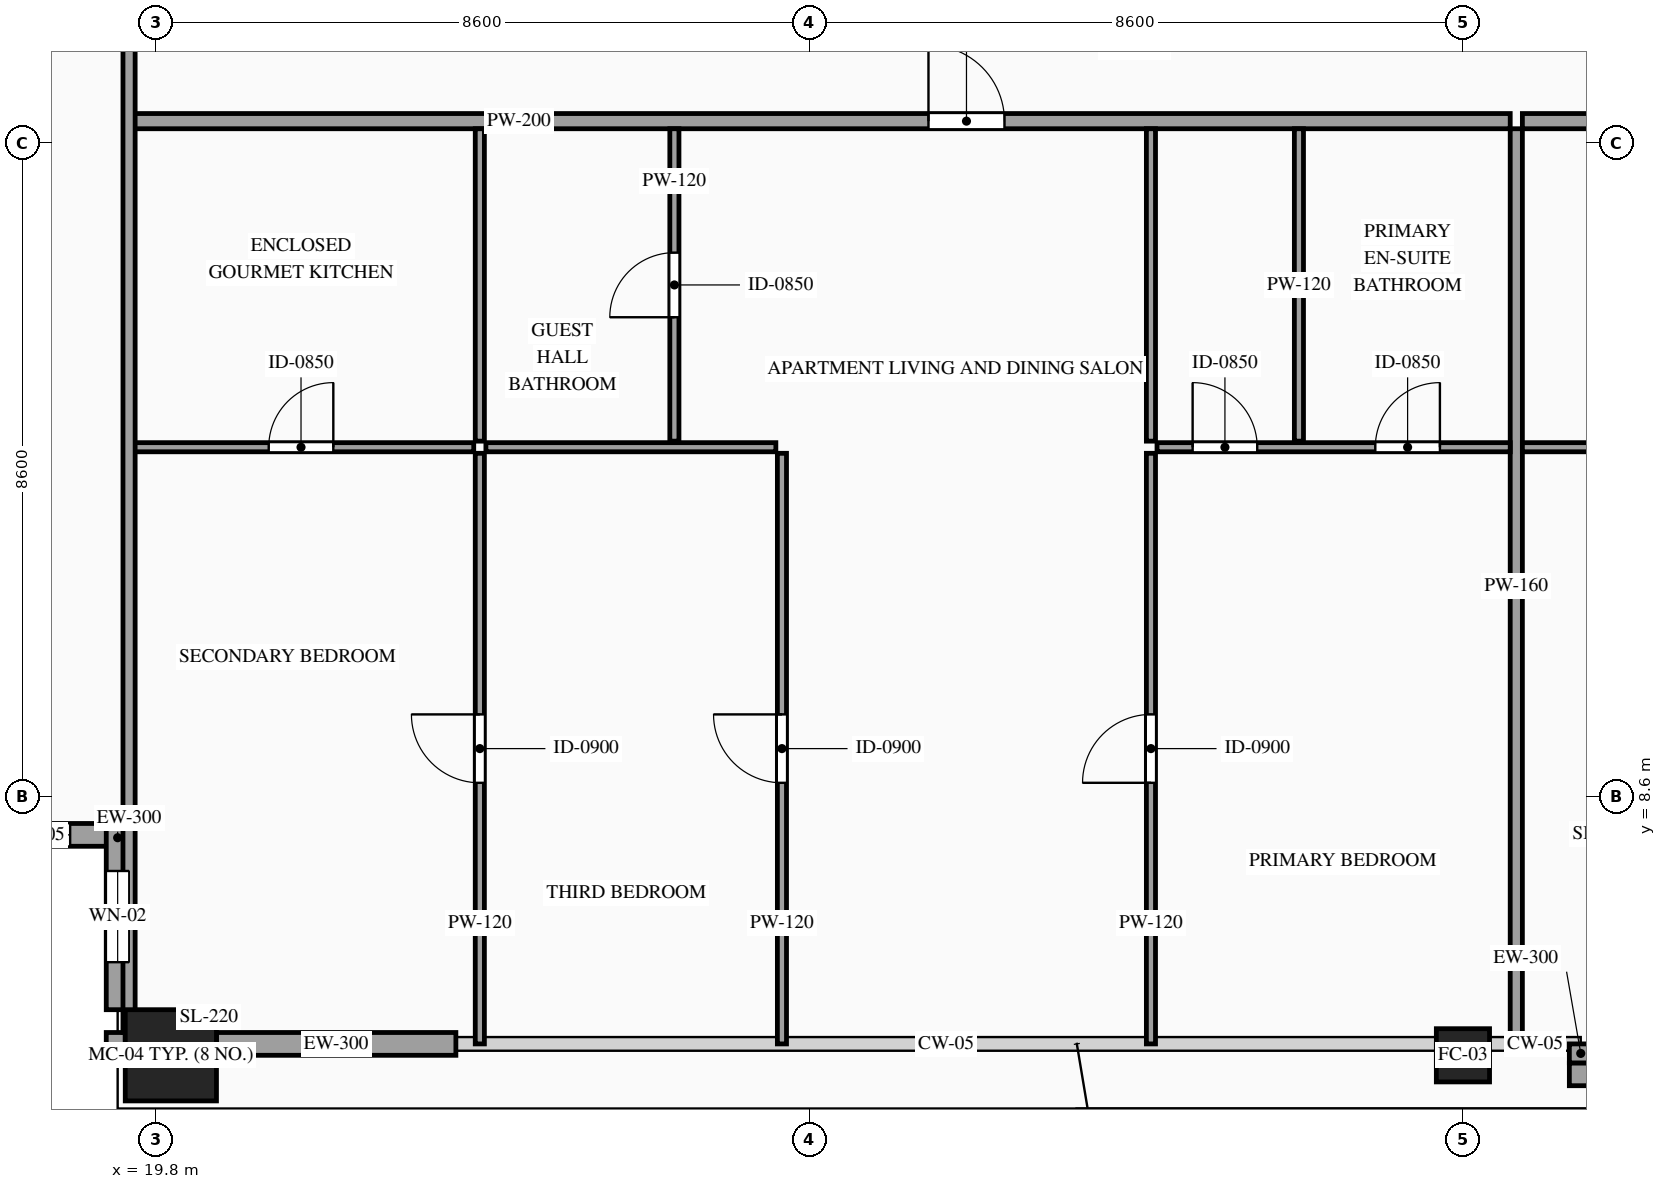
"""IFC4 building model, lengths in metres.
Left out: names, types, materials, properties, quantities, classifications, styles, units other than length and angle.
Written with IfcOpenShell. Run it as: python <this file> out.ifc"""

import sys

from ifc_helpers import new_model, si_unit, direction, frame, frame_2d, origin, origin_2d, place, context, subcontext, project, spatial, rectangle, hollow_rectangle, extrude, source, transform, mapped, element, fill, save


model = new_model("IFC4")
c1 = context("Model", 3, precision=1e-05, world=origin(), true_north=direction((0.0, 1.0)))
c2 = subcontext(c1, "Body", "Model", "MODEL_VIEW")
j1 = project(units=[si_unit("LENGTHUNIT", "METRE"), si_unit("PLANEANGLEUNIT", "RADIAN")], contexts=[c1])
p1 = place(None, origin())
s1 = spatial("IfcSite", under=j1, at=p1, CompositionType="ELEMENT")
p2 = place(p1, origin())
s2 = spatial("IfcBuilding", under=s1, at=p2, CompositionType="ELEMENT")
p3 = place(p2, frame((0.0, 0.0, 227.6)))
s3 = spatial("IfcBuildingStorey", under=s2, at=p3, CompositionType="ELEMENT", Elevation=227.6)
m1 = source(origin(), c2, "Body", "SweptSolid", [
    extrude(hollow_rectangle(XDim=1.2, YDim=1.2, WallThickness=0.055, at=origin_2d()), origin(), (0.0, 0.0, 1.0), 3.5),
])
p4 = place(p3, frame((20.0, 5.2, 0.0), z_axis=(0.0, 0.0, 1.0), x_axis=(1.0, 0.0, 0.0)))
e1 = element("IfcColumn", 1, at=p4, inside=s3, PredefinedType="COLUMN", context=c2, shape_type="MappedRepresentation", body=[
    mapped(m1, transform((0.0, 0.0, 0.0), scale=1.0)),
])
m2 = source(origin(), c2, "Body", "SweptSolid", [
    extrude(hollow_rectangle(XDim=0.7, YDim=0.7, WallThickness=0.032, at=origin_2d()), origin(), (0.0, 0.0, 1.0), 3.5),
])
p5 = place(p3, frame((37.0, 5.2, 0.0), z_axis=(0.0, 0.0, 1.0), x_axis=(1.0, 0.0, 0.0)))
e2 = element("IfcColumn", 2, at=p5, inside=s3, PredefinedType="COLUMN", context=c2, shape_type="MappedRepresentation", body=[
    mapped(m2, transform((0.0, 0.0, 0.0), scale=1.0)),
])
p6 = place(p3, frame((17.0, 8.1, 0.0), z_axis=(0.0, 0.0, 1.0), x_axis=(1.0, 0.0, 0.0)))
e3 = element("IfcWall", 3, at=p6, inside=s3, PredefinedType="SOLIDWALL", context=c2, shape_type="SweptSolid", body=[
    extrude(rectangle(XDim=2.45, YDim=0.3, at=frame_2d((1.225, 0.0))), origin(), (0.0, 0.0, 1.0), 3.28),
])
p7 = place(p6, frame((0.775, 0.0, 0.85)))
e4 = element("IfcOpeningElement", 4, at=p7, cuts=e3, PredefinedType="OPENING", context=c2, shape_type="SweptSolid", body=[
    extrude(rectangle(XDim=0.9, YDim=1.5, at=frame_2d((0.45, 0.75))), frame((0.0, 0.165, 0.0), z_axis=(0.0, -1.0, 0.0), x_axis=(1.0, 0.0, 0.0)), (0.0, 0.0, 1.0), 0.33),
])
p8 = place(p3, frame((19.3, 8.25, 0.0), z_axis=(0.0, 0.0, 1.0), x_axis=(0.0, -1.0, 0.0)))
e5 = element("IfcWall", 5, at=p8, inside=s3, PredefinedType="SOLIDWALL", context=c2, shape_type="SweptSolid", body=[
    extrude(rectangle(XDim=2.45, YDim=0.3, at=frame_2d((1.225, 0.0))), origin(), (0.0, 0.0, 1.0), 3.28),
])
p9 = place(p8, frame((0.625, 0.0, 0.85)))
e6 = element("IfcOpeningElement", 6, at=p9, cuts=e5, PredefinedType="OPENING", context=c2, shape_type="SweptSolid", body=[
    extrude(rectangle(XDim=1.2, YDim=2.1, at=frame_2d((0.6, 1.05))), frame((0.0, 0.165, 0.0), z_axis=(0.0, -1.0, 0.0), x_axis=(1.0, 0.0, 0.0)), (0.0, 0.0, 1.0), 0.33),
])
m3 = source(origin(), c2, "Body", "SweptSolid", [
    extrude(rectangle(XDim=0.25, YDim=0.3, at=frame_2d((0.125, 0.0))), origin(), (0.0, 0.0, 1.0), 3.28),
])
p10 = place(p3, frame((19.15, 5.35, 0.0), z_axis=(0.0, 0.0, 1.0), x_axis=(1.0, 0.0, 0.0)))
e7 = element("IfcWall", 7, at=p10, inside=s3, PredefinedType="SOLIDWALL", context=c2, shape_type="MappedRepresentation", body=[
    mapped(m3, transform((0.0, 0.0, 0.0), scale=1.0)),
])
m4 = source(origin(), c2, "Body", "SweptSolid", [
    extrude(rectangle(XDim=3.15, YDim=0.3, at=frame_2d((1.575, 0.0))), origin(), (0.0, 0.0, 1.0), 2.835),
])
p11 = place(p3, frame((20.6, 5.35, 0.0), z_axis=(0.0, 0.0, 1.0), x_axis=(1.0, 0.0, 0.0)))
e8 = element("IfcWall", 8, at=p11, inside=s3, PredefinedType="SOLIDWALL", context=c2, shape_type="MappedRepresentation", body=[
    mapped(m4, transform((0.0, 0.0, 0.0), scale=1.0)),
])
p12 = place(p3, frame((38.4, 4.95, 0.0), z_axis=(0.0, 0.0, 1.0), x_axis=(1.0, 0.0, 0.0)))
e9 = element("IfcWall", 9, at=p12, inside=s3, PredefinedType="SOLIDWALL", context=c2, shape_type="SweptSolid", body=[
    extrude(rectangle(XDim=2.0, YDim=0.3, at=frame_2d((1.0, 0.0))), origin(), (0.0, 0.0, 1.0), 2.835),
])
p13 = place(p12, frame((0.3, 0.0, 0.0)))
e10 = element("IfcOpeningElement", 10, at=p13, cuts=e9, PredefinedType="OPENING", context=c2, shape_type="SweptSolid", body=[
    extrude(rectangle(XDim=1.4, YDim=2.3, at=frame_2d((0.7, 1.15))), frame((0.0, 0.165, 0.0), z_axis=(0.0, -1.0, 0.0), x_axis=(1.0, 0.0, 0.0)), (0.0, 0.0, 1.0), 0.33),
])
p14 = place(p3, frame((38.55, 5.35, 0.0), z_axis=(0.0, 0.0, 1.0), x_axis=(0.0, -1.0, 0.0)))
e11 = element("IfcWall", 11, at=p14, inside=s3, PredefinedType="SOLIDWALL", context=c2, shape_type="MappedRepresentation", body=[
    mapped(m3, transform((0.0, 0.0, 0.0), scale=1.0)),
])
p15 = place(p3, frame((19.44, 17.49, 0.0), z_axis=(0.0, 0.0, 1.0), x_axis=(1.0, 0.0, 0.0)))
e12 = element("IfcWall", 12, at=p15, inside=s3, PredefinedType="PARTITIONING", context=c2, shape_type="SweptSolid", body=[
    extrude(rectangle(XDim=18.182, YDim=0.2, at=frame_2d((9.091, 0.0))), origin(), (0.0, 0.0, 1.0), 3.28),
])
p16 = place(p15, frame((10.528, 0.0, 0.0)))
e13 = element("IfcOpeningElement", 13, at=p16, cuts=e12, PredefinedType="OPENING", context=c2, shape_type="SweptSolid", body=[
    extrude(rectangle(XDim=1.0, YDim=2.2, at=frame_2d((0.5, 1.1))), frame((0.0, 0.115, 0.0), z_axis=(0.0, -1.0, 0.0), x_axis=(1.0, 0.0, 0.0)), (0.0, 0.0, 1.0), 0.23),
])
m5 = source(origin(), c2, "Body", "SweptSolid", [
    extrude(rectangle(XDim=12.04, YDim=0.16, at=frame_2d((6.02, 0.0))), origin(), (0.0, 0.0, 1.0), 3.28),
])
p17 = place(p3, frame((37.702, 5.35, 0.0), z_axis=(0.0, 0.0, 1.0), x_axis=(0.0, 1.0, 0.0)))
e14 = element("IfcWall", 14, at=p17, inside=s3, PredefinedType="PARTITIONING", context=c2, shape_type="MappedRepresentation", body=[
    mapped(m5, transform((0.0, 0.0, 0.0), scale=1.0)),
])
p18 = place(p3, frame((19.44, 13.2, 0.0), z_axis=(0.0, 0.0, 1.0), x_axis=(1.0, 0.0, 0.0)))
e15 = element("IfcWall", 15, at=p18, inside=s3, PredefinedType="PARTITIONING", context=c2, shape_type="SweptSolid", body=[
    extrude(rectangle(XDim=4.545, YDim=0.12, at=frame_2d((2.272, 0.0))), origin(), (0.0, 0.0, 1.0), 3.28),
])
p19 = place(p18, frame((1.847, 0.0, 0.0)))
e16 = element("IfcOpeningElement", 16, at=p19, cuts=e15, PredefinedType="OPENING", context=c2, shape_type="SweptSolid", body=[
    extrude(rectangle(XDim=0.85, YDim=2.1, at=frame_2d((0.425, 1.05))), frame((0.0, 0.075, 0.0), z_axis=(0.0, -1.0, 0.0), x_axis=(1.0, 0.0, 0.0)), (0.0, 0.0, 1.0), 0.15),
])
m6 = source(origin(), c2, "Body", "SweptSolid", [
    extrude(rectangle(XDim=4.11, YDim=0.12, at=frame_2d((2.055, 0.0))), origin(), (0.0, 0.0, 1.0), 3.28),
])
p20 = place(p3, frame((24.065, 13.28, 0.0), z_axis=(0.0, 0.0, 1.0), x_axis=(0.0, 1.0, 0.0)))
e17 = element("IfcWall", 17, at=p20, inside=s3, PredefinedType="PARTITIONING", context=c2, shape_type="MappedRepresentation", body=[
    mapped(m6, transform((0.0, 0.0, 0.0), scale=1.0)),
])
p21 = place(p3, frame((26.625, 13.28, 0.0), z_axis=(0.0, 0.0, 1.0), x_axis=(0.0, 1.0, 0.0)))
e18 = element("IfcWall", 18, at=p21, inside=s3, PredefinedType="PARTITIONING", context=c2, shape_type="SweptSolid", body=[
    extrude(rectangle(XDim=4.11, YDim=0.12, at=frame_2d((2.055, 0.0))), origin(), (0.0, 0.0, 1.0), 3.28),
])
p22 = place(p21, frame((1.63, 0.0, 0.0)))
e19 = element("IfcOpeningElement", 19, at=p22, cuts=e18, PredefinedType="OPENING", context=c2, shape_type="SweptSolid", body=[
    extrude(rectangle(XDim=0.85, YDim=2.1, at=frame_2d((0.425, 1.05))), frame((0.0, 0.075, 0.0), z_axis=(0.0, -1.0, 0.0), x_axis=(1.0, 0.0, 0.0)), (0.0, 0.0, 1.0), 0.15),
])
for number, where, z_axis, x_axis in (
    (20, (34.842, 13.28, 0.0), (0.0, 0.0, 1.0), (0.0, 1.0, 0.0)),
    (21, (32.895, 13.28, 0.0), (0.0, 0.0, 1.0), (0.0, 1.0, 0.0)),
):
    element("IfcWall", number, at=place(p3, frame(where, z_axis=z_axis, x_axis=x_axis)), inside=s3, PredefinedType="PARTITIONING", context=c2, shape_type="MappedRepresentation", body=[
        mapped(m6, transform((0.0, 0.0, 0.0), scale=1.0)),
    ])
p23 = place(p3, frame((24.065, 5.35, 0.0), z_axis=(0.0, 0.0, 1.0), x_axis=(0.0, 1.0, 0.0)))
e22 = element("IfcWall", 22, at=p23, inside=s3, PredefinedType="PARTITIONING", context=c2, shape_type="SweptSolid", body=[
    extrude(rectangle(XDim=7.77, YDim=0.12, at=frame_2d((3.885, 0.0))), origin(), (0.0, 0.0, 1.0), 3.28),
])
p24 = place(p23, frame((3.435, 0.0, 0.0)))
e23 = element("IfcOpeningElement", 23, at=p24, cuts=e22, PredefinedType="OPENING", context=c2, shape_type="SweptSolid", body=[
    extrude(rectangle(XDim=0.9, YDim=2.15, at=frame_2d((0.45, 1.075))), frame((0.0, 0.075, 0.0), z_axis=(0.0, -1.0, 0.0), x_axis=(1.0, 0.0, 0.0)), (0.0, 0.0, 1.0), 0.15),
])
p25 = place(p3, frame((32.975, 13.2, 0.0), z_axis=(0.0, 0.0, 1.0), x_axis=(1.0, 0.0, 0.0)))
e24 = element("IfcWall", 24, at=p25, inside=s3, PredefinedType="PARTITIONING", context=c2, shape_type="SweptSolid", body=[
    extrude(rectangle(XDim=4.647, YDim=0.12, at=frame_2d((2.323, 0.0))), origin(), (0.0, 0.0, 1.0), 3.28),
])
p26 = place(p25, frame((2.872, 0.0, 0.0)))
e25 = element("IfcOpeningElement", 25, at=p26, cuts=e24, PredefinedType="OPENING", context=c2, shape_type="SweptSolid", body=[
    extrude(rectangle(XDim=0.85, YDim=2.1, at=frame_2d((0.425, 1.05))), frame((0.0, 0.075, 0.0), z_axis=(0.0, -1.0, 0.0), x_axis=(1.0, 0.0, 0.0)), (0.0, 0.0, 1.0), 0.15),
])
p27 = place(p25, frame((0.469, 0.0, 0.0)))
e26 = element("IfcOpeningElement", 26, at=p27, cuts=e24, PredefinedType="OPENING", context=c2, shape_type="SweptSolid", body=[
    extrude(rectangle(XDim=0.85, YDim=2.1, at=frame_2d((0.425, 1.05))), frame((0.0, 0.075, 0.0), z_axis=(0.0, -1.0, 0.0), x_axis=(1.0, 0.0, 0.0)), (0.0, 0.0, 1.0), 0.15),
])
p28 = place(p3, frame((32.895, 5.35, 0.0), z_axis=(0.0, 0.0, 1.0), x_axis=(0.0, 1.0, 0.0)))
e27 = element("IfcWall", 27, at=p28, inside=s3, PredefinedType="PARTITIONING", context=c2, shape_type="SweptSolid", body=[
    extrude(rectangle(XDim=7.77, YDim=0.12, at=frame_2d((3.885, 0.0))), origin(), (0.0, 0.0, 1.0), 3.28),
])
p29 = place(p28, frame((3.435, 0.0, 0.0)))
e28 = element("IfcOpeningElement", 28, at=p29, cuts=e27, PredefinedType="OPENING", context=c2, shape_type="SweptSolid", body=[
    extrude(rectangle(XDim=0.9, YDim=2.15, at=frame_2d((0.45, 1.075))), frame((0.0, 0.075, 0.0), z_axis=(0.0, -1.0, 0.0), x_axis=(1.0, 0.0, 0.0)), (0.0, 0.0, 1.0), 0.15),
])
m7 = source(origin(), c2, "Body", "SweptSolid", [
    extrude(rectangle(XDim=3.815, YDim=0.12, at=frame_2d((1.907, 0.0))), origin(), (0.0, 0.0, 1.0), 3.28),
])
p30 = place(p3, frame((24.145, 13.2, 0.0), z_axis=(0.0, 0.0, 1.0), x_axis=(1.0, 0.0, 0.0)))
e29 = element("IfcWall", 29, at=p30, inside=s3, PredefinedType="PARTITIONING", context=c2, shape_type="MappedRepresentation", body=[
    mapped(m7, transform((0.0, 0.0, 0.0), scale=1.0)),
])
p31 = place(p3, frame((28.04, 5.35, 0.0), z_axis=(0.0, 0.0, 1.0), x_axis=(0.0, 1.0, 0.0)))
e30 = element("IfcWall", 30, at=p31, inside=s3, PredefinedType="PARTITIONING", context=c2, shape_type="SweptSolid", body=[
    extrude(rectangle(XDim=7.77, YDim=0.12, at=frame_2d((3.885, 0.0))), origin(), (0.0, 0.0, 1.0), 3.28),
])
p32 = place(p31, frame((3.435, 0.0, 0.0)))
e31 = element("IfcOpeningElement", 31, at=p32, cuts=e30, PredefinedType="OPENING", context=c2, shape_type="SweptSolid", body=[
    extrude(rectangle(XDim=0.9, YDim=2.15, at=frame_2d((0.45, 1.075))), frame((0.0, 0.075, 0.0), z_axis=(0.0, -1.0, 0.0), x_axis=(1.0, 0.0, 0.0)), (0.0, 0.0, 1.0), 0.15),
])
p33 = place(p3, frame((37.782, 17.49, 0.0), z_axis=(0.0, 0.0, 1.0), x_axis=(1.0, 0.0, 0.0)))
e32 = element("IfcWall", 32, at=p33, inside=s3, PredefinedType="PARTITIONING", context=c2, shape_type="SweptSolid", body=[
    extrude(rectangle(XDim=16.778, YDim=0.2, at=frame_2d((8.389, 0.0))), origin(), (0.0, 0.0, 1.0), 3.28),
])
p34 = place(p33, frame((9.545, 0.0, 0.0)))
e33 = element("IfcOpeningElement", 33, at=p34, cuts=e32, PredefinedType="OPENING", context=c2, shape_type="SweptSolid", body=[
    extrude(rectangle(XDim=1.0, YDim=2.2, at=frame_2d((0.5, 1.1))), frame((0.0, 0.115, 0.0), z_axis=(0.0, -1.0, 0.0), x_axis=(1.0, 0.0, 0.0)), (0.0, 0.0, 1.0), 0.23),
])
p35 = place(p3, frame((37.782, 13.2, 0.0), z_axis=(0.0, 0.0, 1.0), x_axis=(1.0, 0.0, 0.0)))
e34 = element("IfcWall", 34, at=p35, inside=s3, PredefinedType="PARTITIONING", context=c2, shape_type="SweptSolid", body=[
    extrude(rectangle(XDim=4.647, YDim=0.12, at=frame_2d((2.323, 0.0))), origin(), (0.0, 0.0, 1.0), 3.28),
])
p36 = place(p35, frame((1.898, 0.0, 0.0)))
e35 = element("IfcOpeningElement", 35, at=p36, cuts=e34, PredefinedType="OPENING", context=c2, shape_type="SweptSolid", body=[
    extrude(rectangle(XDim=0.85, YDim=2.1, at=frame_2d((0.425, 1.05))), frame((0.0, 0.075, 0.0), z_axis=(0.0, -1.0, 0.0), x_axis=(1.0, 0.0, 0.0)), (0.0, 0.0, 1.0), 0.15),
])
m8 = source(origin(), c2, "Body", "SweptSolid", [
    extrude(rectangle(XDim=26.69, YDim=0.16, at=frame_2d((13.345, 0.0))), origin(), (0.0, 0.0, 1.0), 3.28),
])
p37 = place(p3, frame((19.45, 5.5, 0.0), z_axis=(0.0, 0.0, 1.0), x_axis=(0.0, 1.0, 0.0)))
e36 = element("IfcWall", 36, at=p37, inside=s3, PredefinedType="PARTITIONING", context=c2, shape_type="MappedRepresentation", body=[
    mapped(m8, transform((0.0, 0.0, 0.0), scale=1.0)),
])
m9 = source(origin(), c2, "Body", "SweptSolid", [
    extrude(rectangle(XDim=0.9, YDim=1.5, at=frame_2d((0.45, 0.75))), frame((0.0, 0.03, 0.0), z_axis=(0.0, -1.0, 0.0), x_axis=(1.0, 0.0, 0.0)), (0.0, 0.0, 1.0), 0.06),
])
p38 = place(p7, origin())
e37 = element("IfcWindow", 37, at=p38, inside=s3, PartitioningType="SINGLE_PANEL", PredefinedType="WINDOW", context=c2, shape_type="MappedRepresentation", body=[
    mapped(m9, transform((0.0, 0.0, 0.0), scale=1.0)),
])
fill(e4, e37)
m10 = source(origin(), c2, "Body", "SweptSolid", [
    extrude(rectangle(XDim=1.2, YDim=2.1, at=frame_2d((0.6, 1.05))), frame((0.0, 0.03, 0.0), z_axis=(0.0, -1.0, 0.0), x_axis=(1.0, 0.0, 0.0)), (0.0, 0.0, 1.0), 0.06),
])
p39 = place(p9, origin())
e38 = element("IfcWindow", 38, at=p39, inside=s3, PartitioningType="SINGLE_PANEL", PredefinedType="WINDOW", context=c2, shape_type="MappedRepresentation", body=[
    mapped(m10, transform((0.0, 0.0, 0.0), scale=1.0)),
])
fill(e6, e38)
m11 = source(origin(), c2, "Body", "SweptSolid", [
    extrude(rectangle(XDim=1.0, YDim=2.2, at=frame_2d((0.5, 1.1))), frame((0.0, 0.025, 0.0), z_axis=(0.0, -1.0, 0.0), x_axis=(1.0, 0.0, 0.0)), (0.0, 0.0, 1.0), 0.05),
])
p40 = place(p16, origin())
e39 = element("IfcDoor", 39, at=p40, inside=s3, OperationType="SINGLE_SWING_LEFT", PredefinedType="DOOR", context=c2, shape_type="MappedRepresentation", body=[
    mapped(m11, transform((0.0, 0.0, 0.0), scale=1.0)),
])
fill(e13, e39)
m12 = source(origin(), c2, "Body", "SweptSolid", [
    extrude(rectangle(XDim=0.85, YDim=2.1, at=frame_2d((0.425, 1.05))), frame((0.0, 0.025, 0.0), z_axis=(0.0, -1.0, 0.0), x_axis=(1.0, 0.0, 0.0)), (0.0, 0.0, 1.0), 0.05),
])
p41 = place(p19, origin())
e40 = element("IfcDoor", 40, at=p41, inside=s3, OperationType="SINGLE_SWING_RIGHT", PredefinedType="DOOR", context=c2, shape_type="MappedRepresentation", body=[
    mapped(m12, transform((0.0, 0.0, 0.0), scale=1.0)),
])
fill(e16, e40)
p42 = place(p22, origin())
e41 = element("IfcDoor", 41, at=p42, inside=s3, OperationType="SINGLE_SWING_LEFT", PredefinedType="DOOR", context=c2, shape_type="MappedRepresentation", body=[
    mapped(m12, transform((0.0, 0.0, 0.0), scale=1.0)),
])
fill(e19, e41)
p43 = place(p26, origin())
e42 = element("IfcDoor", 42, at=p43, inside=s3, OperationType="SINGLE_SWING_RIGHT", PredefinedType="DOOR", context=c2, shape_type="MappedRepresentation", body=[
    mapped(m12, transform((0.0, 0.0, 0.0), scale=1.0)),
])
fill(e25, e42)
p44 = place(p27, origin())
e43 = element("IfcDoor", 43, at=p44, inside=s3, OperationType="SINGLE_SWING_LEFT", PredefinedType="DOOR", context=c2, shape_type="MappedRepresentation", body=[
    mapped(m12, transform((0.0, 0.0, 0.0), scale=1.0)),
])
fill(e26, e43)
m13 = source(origin(), c2, "Body", "SweptSolid", [
    extrude(rectangle(XDim=0.9, YDim=2.15, at=frame_2d((0.45, 1.075))), frame((0.0, 0.025, 0.0), z_axis=(0.0, -1.0, 0.0), x_axis=(1.0, 0.0, 0.0)), (0.0, 0.0, 1.0), 0.05),
])
p45 = place(p24, origin())
e44 = element("IfcDoor", 44, at=p45, inside=s3, OperationType="SINGLE_SWING_RIGHT", PredefinedType="DOOR", context=c2, shape_type="MappedRepresentation", body=[
    mapped(m13, transform((0.0, 0.0, 0.0), scale=1.0)),
])
fill(e23, e44)
p46 = place(p29, origin())
e45 = element("IfcDoor", 45, at=p46, inside=s3, OperationType="SINGLE_SWING_LEFT", PredefinedType="DOOR", context=c2, shape_type="MappedRepresentation", body=[
    mapped(m13, transform((0.0, 0.0, 0.0), scale=1.0)),
])
fill(e28, e45)
p47 = place(p32, origin())
e46 = element("IfcDoor", 46, at=p47, inside=s3, OperationType="SINGLE_SWING_RIGHT", PredefinedType="DOOR", context=c2, shape_type="MappedRepresentation", body=[
    mapped(m13, transform((0.0, 0.0, 0.0), scale=1.0)),
])
fill(e31, e46)
save(model, sys.argv[1])
